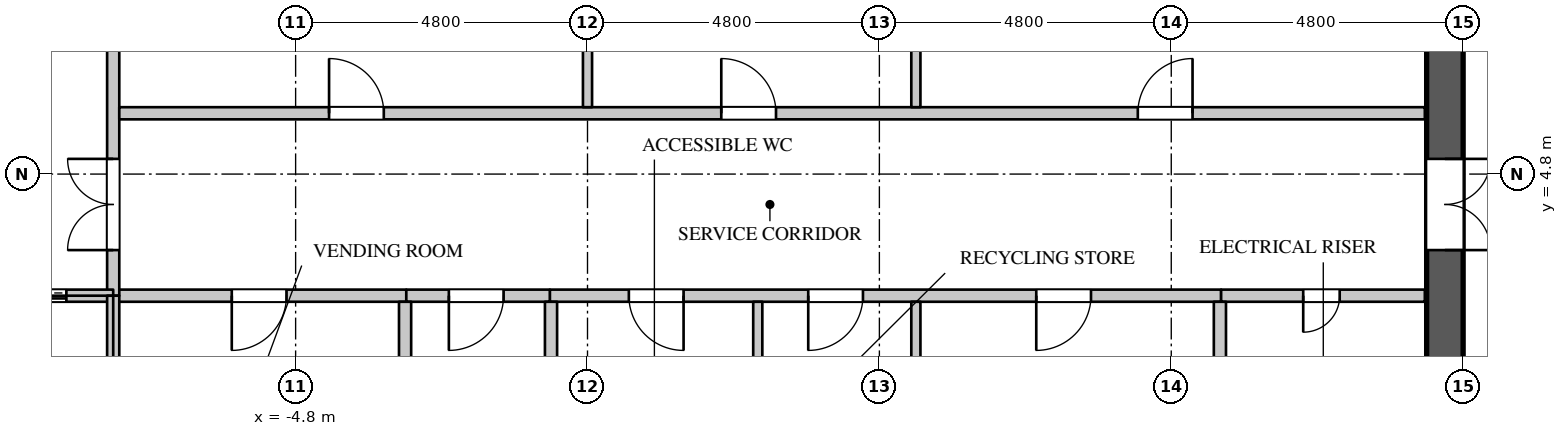
"""IFC4 building model, lengths in metres.
Left out: names, types, materials, properties, quantities, classifications, styles, units other than length and angle.
Written with IfcOpenShell. Run it as: python <this file> out.ifc"""

import sys

from ifc_helpers import new_model, si_unit, direction, frame, frame_2d, origin, place, context, subcontext, project, spatial, rectangle, extrude, element, fill, save


model = new_model("IFC4")
c1 = context("Model", 3, precision=1e-05, world=origin(), true_north=direction((0.0, 1.0)))
c2 = subcontext(c1, "Body", "Model", "MODEL_VIEW")
j1 = project(units=[si_unit("LENGTHUNIT", "METRE"), si_unit("PLANEANGLEUNIT", "RADIAN")], contexts=[c1])
p1 = place(None, origin())
s1 = spatial("IfcSite", under=j1, at=p1, CompositionType="ELEMENT")
p2 = place(p1, origin())
s2 = spatial("IfcBuilding", under=s1, at=p2, CompositionType="ELEMENT")
p3 = place(p2, frame((0.0, 0.0, 226.5)))
s3 = spatial("IfcBuildingStorey", under=s2, at=p3, CompositionType="ELEMENT", Elevation=226.5)
p4 = place(p3, frame((14.1, -11.4, 0.0), z_axis=(0.0, 0.0, 1.0), x_axis=(0.0, 1.0, 0.0)))
e1 = element("IfcWall", 1, at=p4, inside=s3, PredefinedType="SHEAR", context=c2, shape_type="SweptSolid", body=[
    extrude(rectangle(XDim=22.8, YDim=0.6, at=frame_2d((11.4, 0.0))), origin(), (0.0, 0.0, 1.0), 4.2),
])
p5 = place(p4, frame((20.45, 0.0, 0.0)))
e2 = element("IfcOpeningElement", 2, at=p5, cuts=e1, PredefinedType="OPENING", context=c2, shape_type="SweptSolid", body=[
    extrude(rectangle(XDim=1.1, YDim=2.2, at=frame_2d((0.55, 1.1))), frame((0.0, 0.31, 0.0), z_axis=(0.0, -1.0, 0.0), x_axis=(1.0, 0.0, 0.0)), (0.0, 0.0, 1.0), 0.62),
])
p6 = place(p4, frame((1.25, 0.0, 0.0)))
e3 = element("IfcOpeningElement", 3, at=p6, cuts=e1, PredefinedType="OPENING", context=c2, shape_type="SweptSolid", body=[
    extrude(rectangle(XDim=1.1, YDim=2.2, at=frame_2d((0.55, 1.1))), frame((0.0, 0.31, 0.0), z_axis=(0.0, -1.0, 0.0), x_axis=(1.0, 0.0, 0.0)), (0.0, 0.0, 1.0), 0.62),
])
p7 = place(p4, frame((14.95, 0.0, 0.0)))
e4 = element("IfcOpeningElement", 4, at=p7, cuts=e1, PredefinedType="OPENING", context=c2, shape_type="SweptSolid", body=[
    extrude(rectangle(XDim=1.5, YDim=2.4, at=frame_2d((0.75, 1.2))), frame((0.0, 0.31, 0.0), z_axis=(0.0, -1.0, 0.0), x_axis=(1.0, 0.0, 0.0)), (0.0, 0.0, 1.0), 0.62),
])
p8 = place(p4, frame((6.35, 0.0, 0.0)))
e5 = element("IfcOpeningElement", 5, at=p8, cuts=e1, PredefinedType="OPENING", context=c2, shape_type="SweptSolid", body=[
    extrude(rectangle(XDim=1.5, YDim=2.4, at=frame_2d((0.75, 1.2))), frame((0.0, 0.31, 0.0), z_axis=(0.0, -1.0, 0.0), x_axis=(1.0, 0.0, 0.0)), (0.0, 0.0, 1.0), 0.62),
])
p9 = place(p3, frame((-7.8, 2.8, 0.0), z_axis=(0.0, 0.0, 1.0), x_axis=(1.0, 0.0, 0.0)))
e6 = element("IfcWall", 6, at=p9, inside=s3, PredefinedType="PARTITIONING", context=c2, shape_type="SweptSolid", body=[
    extrude(rectangle(XDim=4.82, YDim=0.2, at=frame_2d((2.41, 0.0))), origin(), (0.0, 0.0, 1.0), 3.95),
])
p10 = place(p9, frame((1.95, 0.0, 0.0)))
e7 = element("IfcOpeningElement", 7, at=p10, cuts=e6, PredefinedType="OPENING", context=c2, shape_type="SweptSolid", body=[
    extrude(rectangle(XDim=0.9, YDim=2.2, at=frame_2d((0.45, 1.1))), frame((0.0, 0.11, 0.0), z_axis=(0.0, -1.0, 0.0), x_axis=(1.0, 0.0, 0.0)), (0.0, 0.0, 1.0), 0.22),
])
p11 = place(p3, frame((-7.8, 2.8, 0.0), z_axis=(0.0, 0.0, 1.0), x_axis=(0.0, 1.0, 0.0)))
e8 = element("IfcWall", 8, at=p11, inside=s3, PredefinedType="PARTITIONING", context=c2, shape_type="SweptSolid", body=[
    extrude(rectangle(XDim=5.275, YDim=0.2, at=frame_2d((2.637, 0.0))), origin(), (0.0, 0.0, 1.0), 3.95),
])
p12 = place(p11, frame((0.75, 0.0, 0.0)))
e9 = element("IfcOpeningElement", 9, at=p12, cuts=e8, PredefinedType="OPENING", context=c2, shape_type="SweptSolid", body=[
    extrude(rectangle(XDim=1.5, YDim=2.4, at=frame_2d((0.75, 1.2))), frame((0.0, 0.11, 0.0), z_axis=(0.0, -1.0, 0.0), x_axis=(1.0, 0.0, 0.0)), (0.0, 0.0, 1.0), 0.22),
])
p13 = place(p3, frame((-7.7, 5.8, 0.0), z_axis=(0.0, 0.0, 1.0), x_axis=(1.0, 0.0, 0.0)))
e10 = element("IfcWall", 10, at=p13, inside=s3, PredefinedType="PARTITIONING", context=c2, shape_type="SweptSolid", body=[
    extrude(rectangle(XDim=21.47, YDim=0.2, at=frame_2d((10.735, 0.0))), origin(), (0.0, 0.0, 1.0), 3.95),
])
p14 = place(p13, frame((3.45, 0.0, 0.0)))
e11 = element("IfcOpeningElement", 11, at=p14, cuts=e10, PredefinedType="OPENING", context=c2, shape_type="SweptSolid", body=[
    extrude(rectangle(XDim=0.9, YDim=2.2, at=frame_2d((0.45, 1.1))), frame((0.0, 0.11, 0.0), z_axis=(0.0, -1.0, 0.0), x_axis=(1.0, 0.0, 0.0)), (0.0, 0.0, 1.0), 0.22),
])
p15 = place(p13, frame((9.9, 0.0, 0.0)))
e12 = element("IfcOpeningElement", 12, at=p15, cuts=e10, PredefinedType="OPENING", context=c2, shape_type="SweptSolid", body=[
    extrude(rectangle(XDim=0.9, YDim=2.2, at=frame_2d((0.45, 1.1))), frame((0.0, 0.11, 0.0), z_axis=(0.0, -1.0, 0.0), x_axis=(1.0, 0.0, 0.0)), (0.0, 0.0, 1.0), 0.22),
])
p16 = place(p13, frame((16.75, 0.0, 0.0)))
e13 = element("IfcOpeningElement", 13, at=p16, cuts=e10, PredefinedType="OPENING", context=c2, shape_type="SweptSolid", body=[
    extrude(rectangle(XDim=0.9, YDim=2.2, at=frame_2d((0.45, 1.1))), frame((0.0, 0.11, 0.0), z_axis=(0.0, -1.0, 0.0), x_axis=(1.0, 0.0, 0.0)), (0.0, 0.0, 1.0), 0.22),
])
p17 = place(p3, frame((-0.62, 2.8, 0.0), z_axis=(0.0, 0.0, 1.0), x_axis=(1.0, 0.0, 0.0)))
e14 = element("IfcWall", 14, at=p17, inside=s3, PredefinedType="PARTITIONING", context=c2, shape_type="SweptSolid", body=[
    extrude(rectangle(XDim=11.04, YDim=0.2, at=frame_2d((5.52, 0.0))), origin(), (0.0, 0.0, 1.0), 3.95),
])
p18 = place(p17, frame((1.3, 0.0, 0.0)))
e15 = element("IfcOpeningElement", 15, at=p18, cuts=e14, PredefinedType="OPENING", context=c2, shape_type="SweptSolid", body=[
    extrude(rectangle(XDim=0.9, YDim=2.2, at=frame_2d((0.45, 1.1))), frame((0.0, 0.11, 0.0), z_axis=(0.0, -1.0, 0.0), x_axis=(1.0, 0.0, 0.0)), (0.0, 0.0, 1.0), 0.22),
])
p19 = place(p17, frame((4.25, 0.0, 0.0)))
e16 = element("IfcOpeningElement", 16, at=p19, cuts=e14, PredefinedType="OPENING", context=c2, shape_type="SweptSolid", body=[
    extrude(rectangle(XDim=0.9, YDim=2.2, at=frame_2d((0.45, 1.1))), frame((0.0, 0.11, 0.0), z_axis=(0.0, -1.0, 0.0), x_axis=(1.0, 0.0, 0.0)), (0.0, 0.0, 1.0), 0.22),
])
p20 = place(p17, frame((8.0, 0.0, 0.0)))
e17 = element("IfcOpeningElement", 17, at=p20, cuts=e14, PredefinedType="OPENING", context=c2, shape_type="SweptSolid", body=[
    extrude(rectangle(XDim=0.9, YDim=2.2, at=frame_2d((0.45, 1.1))), frame((0.0, 0.11, 0.0), z_axis=(0.0, -1.0, 0.0), x_axis=(1.0, 0.0, 0.0)), (0.0, 0.0, 1.0), 0.22),
])
p21 = place(p3, frame((0.0, 5.9, 0.0), z_axis=(0.0, 0.0, 1.0), x_axis=(0.0, 1.0, 0.0)))
e18 = element("IfcWall", 18, at=p21, inside=s3, PredefinedType="PARTITIONING", context=c2, shape_type="SweptSolid", body=[
    extrude(rectangle(XDim=5.47, YDim=0.15, at=frame_2d((2.735, 0.0))), origin(), (0.0, 0.0, 1.0), 3.95),
])
for number, where, z_axis, x_axis in (
    (19, (2.8, 0.1, 0.0), (0.0, 0.0, 1.0), (0.0, 1.0, 0.0)),
    (20, (5.4, 0.1, 0.0), (0.0, 0.0, 1.0), (0.0, 1.0, 0.0)),
):
    element("IfcWall", number, at=place(p3, frame(where, z_axis=z_axis, x_axis=x_axis)), inside=s3, PredefinedType="PARTITIONING", context=c2, shape_type="SweptSolid", body=[
        extrude(rectangle(XDim=2.6, YDim=0.15, at=frame_2d((1.3, 0.0))), origin(), (0.0, 0.0, 1.0), 3.95),
    ])
p22 = place(p3, frame((5.4, 5.9, 0.0), z_axis=(0.0, 0.0, 1.0), x_axis=(0.0, 1.0, 0.0)))
e21 = element("IfcWall", 21, at=p22, inside=s3, PredefinedType="PARTITIONING", context=c2, shape_type="SweptSolid", body=[
    extrude(rectangle(XDim=2.3, YDim=0.15, at=frame_2d((1.15, 0.0))), origin(), (0.0, 0.0, 1.0), 3.95),
])
p23 = place(p3, frame((-2.98, 2.8, 0.0), z_axis=(0.0, 0.0, 1.0), x_axis=(1.0, 0.0, 0.0)))
e22 = element("IfcWall", 22, at=p23, inside=s3, PredefinedType="PARTITIONING", context=c2, shape_type="SweptSolid", body=[
    extrude(rectangle(XDim=2.36, YDim=0.2, at=frame_2d((1.18, 0.0))), origin(), (0.0, 0.0, 1.0), 3.95),
])
p24 = place(p23, frame((0.7, 0.0, 0.0)))
e23 = element("IfcOpeningElement", 23, at=p24, cuts=e22, PredefinedType="OPENING", context=c2, shape_type="SweptSolid", body=[
    extrude(rectangle(XDim=0.9, YDim=2.2, at=frame_2d((0.45, 1.1))), frame((0.0, 0.11, 0.0), z_axis=(0.0, -1.0, 0.0), x_axis=(1.0, 0.0, 0.0)), (0.0, 0.0, 1.0), 0.22),
])
for number, where, z_axis, x_axis in (
    (24, (-3.0, 0.1, 0.0), (0.0, 0.0, 1.0), (0.0, 1.0, 0.0)),
    (25, (-0.6, 0.1, 0.0), (0.0, 0.0, 1.0), (0.0, 1.0, 0.0)),
):
    element("IfcWall", number, at=place(p3, frame(where, z_axis=z_axis, x_axis=x_axis)), inside=s3, PredefinedType="PARTITIONING", context=c2, shape_type="SweptSolid", body=[
        extrude(rectangle(XDim=2.6, YDim=0.2, at=frame_2d((1.3, 0.0))), origin(), (0.0, 0.0, 1.0), 3.95),
    ])
p25 = place(p3, frame((10.42, 2.8, 0.0), z_axis=(0.0, 0.0, 1.0), x_axis=(1.0, 0.0, 0.0)))
e26 = element("IfcWall", 26, at=p25, inside=s3, PredefinedType="PARTITIONING", context=c2, shape_type="SweptSolid", body=[
    extrude(rectangle(XDim=3.35, YDim=0.2, at=frame_2d((1.675, 0.0))), origin(), (0.0, 0.0, 1.0), 3.95),
])
p26 = place(p25, frame((1.35, 0.0, 0.0)))
e27 = element("IfcOpeningElement", 27, at=p26, cuts=e26, PredefinedType="OPENING", context=c2, shape_type="SweptSolid", body=[
    extrude(rectangle(XDim=0.6, YDim=2.0, at=frame_2d((0.3, 1.0))), frame((0.0, 0.11, 0.0), z_axis=(0.0, -1.0, 0.0), x_axis=(1.0, 0.0, 0.0)), (0.0, 0.0, 1.0), 0.22),
])
p27 = place(p3, frame((10.4, 0.1, 0.0), z_axis=(0.0, 0.0, 1.0), x_axis=(0.0, 1.0, 0.0)))
e28 = element("IfcWall", 28, at=p27, inside=s3, PredefinedType="PARTITIONING", context=c2, shape_type="SweptSolid", body=[
    extrude(rectangle(XDim=2.6, YDim=0.2, at=frame_2d((1.3, 0.0))), origin(), (0.0, 0.0, 1.0), 3.95),
])
p28 = place(p3, frame((-13.77, 2.8, 0.0), z_axis=(0.0, 0.0, 1.0), x_axis=(1.0, 0.0, 0.0)))
e29 = element("IfcWall", 29, at=p28, inside=s3, PredefinedType="PARTITIONING", context=c2, shape_type="SweptSolid", body=[
    extrude(rectangle(XDim=5.97, YDim=0.2, at=frame_2d((2.985, 0.0))), origin(), (0.0, 0.0, 1.0), 3.95),
])
p29 = place(p28, frame((1.1, 0.0, 0.0)))
e30 = element("IfcOpeningElement", 30, at=p29, cuts=e29, PredefinedType="OPENING", context=c2, shape_type="SweptSolid", body=[
    extrude(rectangle(XDim=1.1, YDim=2.2, at=frame_2d((0.55, 1.1))), frame((0.0, 0.11, 0.0), z_axis=(0.0, -1.0, 0.0), x_axis=(1.0, 0.0, 0.0)), (0.0, 0.0, 1.0), 0.22),
])
p30 = place(p28, frame((4.1, 0.0, 0.0)))
e31 = element("IfcOpeningElement", 31, at=p30, cuts=e29, PredefinedType="OPENING", context=c2, shape_type="SweptSolid", body=[
    extrude(rectangle(XDim=1.1, YDim=2.2, at=frame_2d((0.55, 1.1))), frame((0.0, 0.11, 0.0), z_axis=(0.0, -1.0, 0.0), x_axis=(1.0, 0.0, 0.0)), (0.0, 0.0, 1.0), 0.22),
])
p31 = place(p3, frame((-7.8, 0.0, 0.0), z_axis=(0.0, 0.0, 1.0), x_axis=(0.0, 1.0, 0.0)))
e32 = element("IfcWall", 32, at=p31, inside=s3, PredefinedType="PARTITIONING", context=c2, shape_type="SweptSolid", body=[
    extrude(rectangle(XDim=2.8, YDim=0.2, at=frame_2d((1.4, 0.0))), origin(), (0.0, 0.0, 1.0), 3.95),
])
p32 = place(p26, origin())
e33 = element("IfcDoor", 33, at=p32, inside=s3, OperationType="SINGLE_SWING_RIGHT", PredefinedType="DOOR", context=c2, shape_type="SweptSolid", body=[
    extrude(rectangle(XDim=0.6, YDim=2.0, at=frame_2d((0.3, 1.0))), frame((0.0, 0.025, 0.0), z_axis=(0.0, -1.0, 0.0), x_axis=(1.0, 0.0, 0.0)), (0.0, 0.0, 1.0), 0.05),
])
fill(e27, e33)
p33 = place(p14, origin())
e34 = element("IfcDoor", 34, at=p33, inside=s3, OperationType="SINGLE_SWING_LEFT", PredefinedType="DOOR", context=c2, shape_type="SweptSolid", body=[
    extrude(rectangle(XDim=0.9, YDim=2.2, at=frame_2d((0.45, 1.1))), frame((0.0, 0.025, 0.0), z_axis=(0.0, -1.0, 0.0), x_axis=(1.0, 0.0, 0.0)), (0.0, 0.0, 1.0), 0.05),
])
fill(e11, e34)
p34 = place(p15, origin())
e35 = element("IfcDoor", 35, at=p34, inside=s3, OperationType="SINGLE_SWING_LEFT", PredefinedType="DOOR", context=c2, shape_type="SweptSolid", body=[
    extrude(rectangle(XDim=0.9, YDim=2.2, at=frame_2d((0.45, 1.1))), frame((0.0, 0.025, 0.0), z_axis=(0.0, -1.0, 0.0), x_axis=(1.0, 0.0, 0.0)), (0.0, 0.0, 1.0), 0.05),
])
fill(e12, e35)
p35 = place(p16, origin())
e36 = element("IfcDoor", 36, at=p35, inside=s3, OperationType="SINGLE_SWING_RIGHT", PredefinedType="DOOR", context=c2, shape_type="SweptSolid", body=[
    extrude(rectangle(XDim=0.9, YDim=2.2, at=frame_2d((0.45, 1.1))), frame((0.0, 0.025, 0.0), z_axis=(0.0, -1.0, 0.0), x_axis=(1.0, 0.0, 0.0)), (0.0, 0.0, 1.0), 0.05),
])
fill(e13, e36)
p36 = place(p10, origin())
e37 = element("IfcDoor", 37, at=p36, inside=s3, OperationType="SINGLE_SWING_RIGHT", PredefinedType="DOOR", context=c2, shape_type="SweptSolid", body=[
    extrude(rectangle(XDim=0.9, YDim=2.2, at=frame_2d((0.45, 1.1))), frame((0.0, 0.025, 0.0), z_axis=(0.0, -1.0, 0.0), x_axis=(1.0, 0.0, 0.0)), (0.0, 0.0, 1.0), 0.05),
])
fill(e7, e37)
p37 = place(p24, origin())
e38 = element("IfcDoor", 38, at=p37, inside=s3, OperationType="SINGLE_SWING_RIGHT", PredefinedType="DOOR", context=c2, shape_type="SweptSolid", body=[
    extrude(rectangle(XDim=0.9, YDim=2.2, at=frame_2d((0.45, 1.1))), frame((0.0, 0.025, 0.0), z_axis=(0.0, -1.0, 0.0), x_axis=(1.0, 0.0, 0.0)), (0.0, 0.0, 1.0), 0.05),
])
fill(e23, e38)
p38 = place(p18, origin())
e39 = element("IfcDoor", 39, at=p38, inside=s3, OperationType="SINGLE_SWING_LEFT", PredefinedType="DOOR", context=c2, shape_type="SweptSolid", body=[
    extrude(rectangle(XDim=0.9, YDim=2.2, at=frame_2d((0.45, 1.1))), frame((0.0, 0.025, 0.0), z_axis=(0.0, -1.0, 0.0), x_axis=(1.0, 0.0, 0.0)), (0.0, 0.0, 1.0), 0.05),
])
fill(e15, e39)
p39 = place(p19, origin())
e40 = element("IfcDoor", 40, at=p39, inside=s3, OperationType="SINGLE_SWING_RIGHT", PredefinedType="DOOR", context=c2, shape_type="SweptSolid", body=[
    extrude(rectangle(XDim=0.9, YDim=2.2, at=frame_2d((0.45, 1.1))), frame((0.0, 0.025, 0.0), z_axis=(0.0, -1.0, 0.0), x_axis=(1.0, 0.0, 0.0)), (0.0, 0.0, 1.0), 0.05),
])
fill(e16, e40)
p40 = place(p20, origin())
e41 = element("IfcDoor", 41, at=p40, inside=s3, OperationType="SINGLE_SWING_RIGHT", PredefinedType="DOOR", context=c2, shape_type="SweptSolid", body=[
    extrude(rectangle(XDim=0.9, YDim=2.2, at=frame_2d((0.45, 1.1))), frame((0.0, 0.025, 0.0), z_axis=(0.0, -1.0, 0.0), x_axis=(1.0, 0.0, 0.0)), (0.0, 0.0, 1.0), 0.05),
])
fill(e17, e41)
p41 = place(p30, origin())
e42 = element("IfcDoor", 42, at=p41, inside=s3, OperationType="DOUBLE_DOOR_SLIDING", PredefinedType="DOOR", context=c2, shape_type="SweptSolid", body=[
    extrude(rectangle(XDim=1.1, YDim=2.2, at=frame_2d((0.55, 1.1))), frame((0.0, 0.025, 0.0), z_axis=(0.0, -1.0, 0.0), x_axis=(1.0, 0.0, 0.0)), (0.0, 0.0, 1.0), 0.05),
])
fill(e31, e42)
p42 = place(p12, origin())
e43 = element("IfcDoor", 43, at=p42, inside=s3, OperationType="DOUBLE_DOOR_SINGLE_SWING", PredefinedType="DOOR", context=c2, shape_type="SweptSolid", body=[
    extrude(rectangle(XDim=1.5, YDim=2.4, at=frame_2d((0.75, 1.2))), frame((0.0, 0.025, 0.0), z_axis=(0.0, -1.0, 0.0), x_axis=(1.0, 0.0, 0.0)), (0.0, 0.0, 1.0), 0.05),
])
fill(e9, e43)
p43 = place(p7, origin())
e44 = element("IfcDoor", 44, at=p43, inside=s3, OperationType="DOUBLE_DOOR_SINGLE_SWING", PredefinedType="DOOR", context=c2, shape_type="SweptSolid", body=[
    extrude(rectangle(XDim=1.5, YDim=2.4, at=frame_2d((0.75, 1.2))), frame((0.0, -0.245, 0.0), z_axis=(0.0, -1.0, 0.0), x_axis=(1.0, 0.0, 0.0)), (0.0, 0.0, 1.0), 0.05),
])
fill(e4, e44)
save(model, sys.argv[1])
